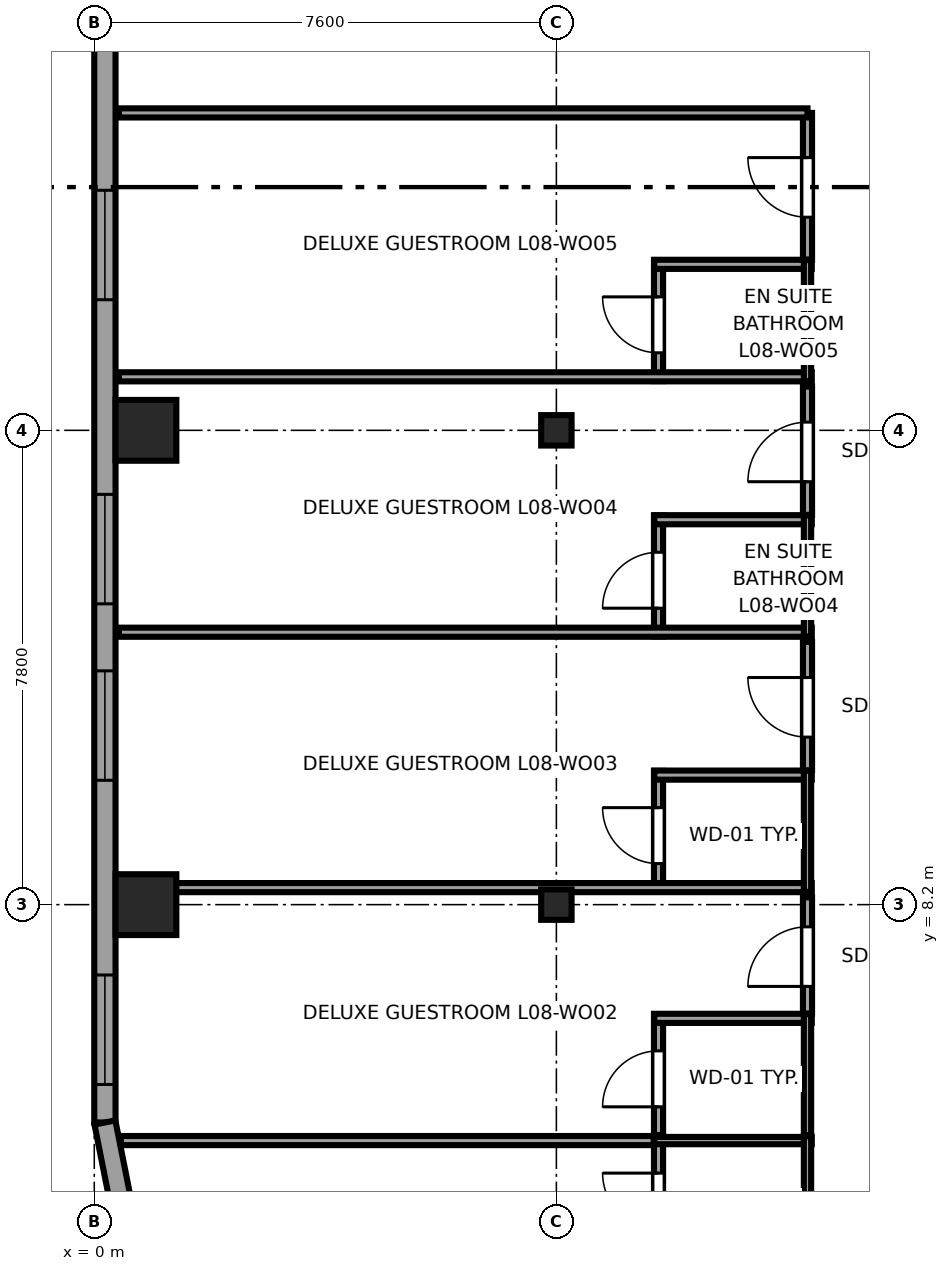
"""IFC4 building model, lengths in metres.
Left out: names, types, materials, properties, quantities, classifications, styles, units other than length and angle.
Written with IfcOpenShell. Run it as: python <this file> out.ifc"""

import sys

from ifc_helpers import new_model, si_unit, direction, frame, frame_2d, origin, origin_2d, place, context, subcontext, project, spatial, rectangle, i_section, extrude, source, transform, mapped, element, fill, save


model = new_model("IFC4")
c1 = context("Model", 3, precision=1e-05, world=origin(), true_north=direction((0.0, 1.0)))
c2 = subcontext(c1, "Body", "Model", "MODEL_VIEW")
j1 = project(units=[si_unit("LENGTHUNIT", "METRE"), si_unit("PLANEANGLEUNIT", "RADIAN")], contexts=[c1])
p1 = place(None, origin())
s1 = spatial("IfcSite", under=j1, at=p1, CompositionType="ELEMENT")
p2 = place(p1, origin())
s2 = spatial("IfcBuilding", under=s1, at=p2, CompositionType="ELEMENT")
p3 = place(p2, frame((0.0, 0.0, 39.1)))
s3 = spatial("IfcBuildingStorey", under=s2, at=p3, CompositionType="ELEMENT", Elevation=39.1)
m1 = source(origin(), c2, "Body", "SweptSolid", [
    extrude(rectangle(XDim=1.0, YDim=1.0, at=origin_2d()), origin(), (0.0, 0.0, 1.0), 3.55),
])
for number, where, z_axis, x_axis in (
    (1, (0.85, 8.2, 0.0), (0.0, 0.0, 1.0), (1.0, 0.0, 0.0)),
    (2, (0.85, 16.0, 0.0), (0.0, 0.0, 1.0), (1.0, 0.0, 0.0)),
):
    element("IfcColumn", number, at=place(p3, frame(where, z_axis=z_axis, x_axis=x_axis)), inside=s3, PredefinedType="COLUMN", context=c2, shape_type="MappedRepresentation", body=[
        mapped(m1, transform((0.0, 0.0, 0.0), x_axis=(1.0, 0.0, 0.0), y_axis=(0.0, 1.0, 0.0), z_axis=(0.0, 0.0, 1.0), scale=1.0)),
    ])
m2 = source(origin(), c2, "Body", "SweptSolid", [
    extrude(i_section(OverallWidth=0.5, OverallDepth=0.5, WebThickness=0.028, FlangeThickness=0.045, at=origin_2d()), origin(), (0.0, 0.0, 1.0), 3.55),
])
for number, where, z_axis, x_axis in (
    (3, (7.6, 8.2, 0.0), (0.0, 0.0, 1.0), (1.0, 0.0, 0.0)),
    (4, (7.6, 16.0, 0.0), (0.0, 0.0, 1.0), (1.0, 0.0, 0.0)),
):
    element("IfcColumn", number, at=place(p3, frame(where, z_axis=z_axis, x_axis=x_axis)), inside=s3, PredefinedType="COLUMN", context=c2, shape_type="MappedRepresentation", body=[
        mapped(m2, transform((0.0, 0.0, 0.0), x_axis=(1.0, 0.0, 0.0), y_axis=(0.0, 1.0, 0.0), z_axis=(0.0, 0.0, 1.0), scale=1.0)),
    ])
p4 = place(p3, frame((0.175, 41.383, 0.0), z_axis=(0.0, 0.0, 1.0), x_axis=(0.0, -1.0, 0.0)))
e5 = element("IfcWall", 5, at=p4, inside=s3, PredefinedType="SOLIDWALL", context=c2, shape_type="SweptSolid", body=[
    extrude(rectangle(XDim=36.766, YDim=0.35, at=frame_2d((18.383, 0.0))), origin(), (0.0, 0.0, 1.0), 3.37),
])
p5 = place(p4, frame((1.676, 0.0, 0.68)))
e6 = element("IfcOpeningElement", 6, at=p5, cuts=e5, PredefinedType="OPENING", context=c2, shape_type="SweptSolid", body=[
    extrude(rectangle(XDim=1.8, YDim=1.85, at=frame_2d((0.9, 0.925))), frame((0.0, 0.185, 0.0), z_axis=(0.0, -1.0, 0.0), x_axis=(1.0, 0.0, 0.0)), (0.0, 0.0, 1.0), 0.37),
])
p6 = place(p4, frame((4.578, 0.0, 0.68)))
e7 = element("IfcOpeningElement", 7, at=p6, cuts=e5, PredefinedType="OPENING", context=c2, shape_type="SweptSolid", body=[
    extrude(rectangle(XDim=1.8, YDim=1.85, at=frame_2d((0.9, 0.925))), frame((0.0, 0.185, 0.0), z_axis=(0.0, -1.0, 0.0), x_axis=(1.0, 0.0, 0.0)), (0.0, 0.0, 1.0), 0.37),
])
p7 = place(p4, frame((13.531, 0.0, 0.68)))
e8 = element("IfcOpeningElement", 8, at=p7, cuts=e5, PredefinedType="OPENING", context=c2, shape_type="SweptSolid", body=[
    extrude(rectangle(XDim=1.8, YDim=1.85, at=frame_2d((0.9, 0.925))), frame((0.0, 0.185, 0.0), z_axis=(0.0, -1.0, 0.0), x_axis=(1.0, 0.0, 0.0)), (0.0, 0.0, 1.0), 0.37),
])
p8 = place(p4, frame((21.435, 0.0, 0.68)))
e9 = element("IfcOpeningElement", 9, at=p8, cuts=e5, PredefinedType="OPENING", context=c2, shape_type="SweptSolid", body=[
    extrude(rectangle(XDim=1.8, YDim=1.85, at=frame_2d((0.9, 0.925))), frame((0.0, 0.185, 0.0), z_axis=(0.0, -1.0, 0.0), x_axis=(1.0, 0.0, 0.0)), (0.0, 0.0, 1.0), 0.37),
])
p9 = place(p4, frame((26.436, 0.0, 0.68)))
e10 = element("IfcOpeningElement", 10, at=p9, cuts=e5, PredefinedType="OPENING", context=c2, shape_type="SweptSolid", body=[
    extrude(rectangle(XDim=1.8, YDim=1.85, at=frame_2d((0.9, 0.925))), frame((0.0, 0.185, 0.0), z_axis=(0.0, -1.0, 0.0), x_axis=(1.0, 0.0, 0.0)), (0.0, 0.0, 1.0), 0.37),
])
p10 = place(p4, frame((29.338, 0.0, 0.68)))
e11 = element("IfcOpeningElement", 11, at=p10, cuts=e5, PredefinedType="OPENING", context=c2, shape_type="SweptSolid", body=[
    extrude(rectangle(XDim=1.8, YDim=1.85, at=frame_2d((0.9, 0.925))), frame((0.0, 0.185, 0.0), z_axis=(0.0, -1.0, 0.0), x_axis=(1.0, 0.0, 0.0)), (0.0, 0.0, 1.0), 0.37),
])
p11 = place(p4, frame((34.34, 0.0, 0.68)))
e12 = element("IfcOpeningElement", 12, at=p11, cuts=e5, PredefinedType="OPENING", context=c2, shape_type="SweptSolid", body=[
    extrude(rectangle(XDim=1.8, YDim=1.85, at=frame_2d((0.9, 0.925))), frame((0.0, 0.185, 0.0), z_axis=(0.0, -1.0, 0.0), x_axis=(1.0, 0.0, 0.0)), (0.0, 0.0, 1.0), 0.37),
])
p12 = place(p3, frame((0.175, 4.617, 0.0), z_axis=(0.0, 0.0, 1.0), x_axis=(0.195011420161, -0.980800971659, 0.0)))
e13 = element("IfcWall", 13, at=p12, inside=s3, PredefinedType="SOLIDWALL", context=c2, shape_type="SweptSolid", body=[
    extrude(rectangle(XDim=1.743, YDim=0.35, at=frame_2d((0.871, 0.0))), origin(), (0.0, 0.0, 1.0), 3.37),
])
p13 = place(p3, frame((9.28, 2.4, 0.0), z_axis=(0.0, 0.0, 1.0), x_axis=(0.0, 1.0, 0.0)))
e14 = element("IfcWall", 14, at=p13, inside=s3, PredefinedType="PARTITIONING", context=c2, shape_type="SweptSolid", body=[
    extrude(rectangle(XDim=1.99, YDim=0.15, at=frame_2d((0.995, 0.0))), origin(), (0.0, 0.0, 1.0), 3.37),
])
p14 = place(p13, frame((0.465, 0.0, 0.0)))
e15 = element("IfcOpeningElement", 15, at=p14, cuts=e14, PredefinedType="OPENING", context=c2, shape_type="SweptSolid", body=[
    extrude(rectangle(XDim=0.92, YDim=2.01, at=frame_2d((0.46, 1.005))), frame((0.0, 0.085, 0.0), z_axis=(0.0, -1.0, 0.0), x_axis=(1.0, 0.0, 0.0)), (0.0, 0.0, 1.0), 0.17),
])
p15 = place(p3, frame((9.21, 4.32, 0.0), z_axis=(0.0, 0.0, 1.0), x_axis=(1.0, 0.0, 0.0)))
e16 = element("IfcWall", 16, at=p15, inside=s3, PredefinedType="PLUMBINGWALL", context=c2, shape_type="SweptSolid", body=[
    extrude(rectangle(XDim=2.59, YDim=0.12, at=frame_2d((1.295, 0.0))), origin(), (0.0, 0.0, 1.0), 3.37),
])
p16 = place(p3, frame((11.73, 2.4, 0.0), z_axis=(0.0, 0.0, 1.0), x_axis=(0.0, 1.0, 0.0)))
e17 = element("IfcWall", 17, at=p16, inside=s3, PredefinedType="PLUMBINGWALL", context=c2, shape_type="SweptSolid", body=[
    extrude(rectangle(XDim=1.99, YDim=0.12, at=frame_2d((0.995, 0.0))), origin(), (0.0, 0.0, 1.0), 3.37),
])
p17 = place(p3, frame((9.28, 4.41, 0.0), z_axis=(0.0, 0.0, 1.0), x_axis=(0.0, 1.0, 0.0)))
e18 = element("IfcWall", 18, at=p17, inside=s3, PredefinedType="PARTITIONING", context=c2, shape_type="SweptSolid", body=[
    extrude(rectangle(XDim=1.99, YDim=0.15, at=frame_2d((0.995, 0.0))), origin(), (0.0, 0.0, 1.0), 3.37),
])
p18 = place(p17, frame((0.465, 0.0, 0.0)))
e19 = element("IfcOpeningElement", 19, at=p18, cuts=e18, PredefinedType="OPENING", context=c2, shape_type="SweptSolid", body=[
    extrude(rectangle(XDim=0.92, YDim=2.01, at=frame_2d((0.46, 1.005))), frame((0.0, 0.085, 0.0), z_axis=(0.0, -1.0, 0.0), x_axis=(1.0, 0.0, 0.0)), (0.0, 0.0, 1.0), 0.17),
])
p19 = place(p3, frame((9.21, 6.33, 0.0), z_axis=(0.0, 0.0, 1.0), x_axis=(1.0, 0.0, 0.0)))
e20 = element("IfcWall", 20, at=p19, inside=s3, PredefinedType="PARTITIONING", context=c2, shape_type="SweptSolid", body=[
    extrude(rectangle(XDim=2.59, YDim=0.15, at=frame_2d((1.295, 0.0))), origin(), (0.0, 0.0, 1.0), 3.37),
])
p20 = place(p3, frame((11.73, 4.41, 0.0), z_axis=(0.0, 0.0, 1.0), x_axis=(0.0, 1.0, 0.0)))
e21 = element("IfcWall", 21, at=p20, inside=s3, PredefinedType="PLUMBINGWALL", context=c2, shape_type="SweptSolid", body=[
    extrude(rectangle(XDim=1.99, YDim=0.12, at=frame_2d((0.995, 0.0))), origin(), (0.0, 0.0, 1.0), 3.37),
])
p21 = place(p3, frame((9.28, 8.41, 0.0), z_axis=(0.0, 0.0, 1.0), x_axis=(0.0, 1.0, 0.0)))
e22 = element("IfcWall", 22, at=p21, inside=s3, PredefinedType="PARTITIONING", context=c2, shape_type="SweptSolid", body=[
    extrude(rectangle(XDim=1.99, YDim=0.15, at=frame_2d((0.995, 0.0))), origin(), (0.0, 0.0, 1.0), 3.37),
])
p22 = place(p21, frame((0.465, 0.0, 0.0)))
e23 = element("IfcOpeningElement", 23, at=p22, cuts=e22, PredefinedType="OPENING", context=c2, shape_type="SweptSolid", body=[
    extrude(rectangle(XDim=0.92, YDim=2.01, at=frame_2d((0.46, 1.005))), frame((0.0, 0.085, 0.0), z_axis=(0.0, -1.0, 0.0), x_axis=(1.0, 0.0, 0.0)), (0.0, 0.0, 1.0), 0.17),
])
p23 = place(p3, frame((0.405, 8.48, 0.0), z_axis=(0.0, 0.0, 1.0), x_axis=(1.0, 0.0, 0.0)))
e24 = element("IfcWall", 24, at=p23, inside=s3, PredefinedType="PARTITIONING", context=c2, shape_type="SweptSolid", body=[
    extrude(rectangle(XDim=11.395, YDim=0.15, at=frame_2d((5.698, 0.0))), origin(), (0.0, 0.0, 1.0), 3.37),
])
p24 = place(p3, frame((9.21, 10.33, 0.0), z_axis=(0.0, 0.0, 1.0), x_axis=(1.0, 0.0, 0.0)))
e25 = element("IfcWall", 25, at=p24, inside=s3, PredefinedType="PARTITIONING", context=c2, shape_type="SweptSolid", body=[
    extrude(rectangle(XDim=2.59, YDim=0.15, at=frame_2d((1.295, 0.0))), origin(), (0.0, 0.0, 1.0), 3.37),
])
p25 = place(p3, frame((11.73, 8.41, 0.0), z_axis=(0.0, 0.0, 1.0), x_axis=(0.0, 1.0, 0.0)))
e26 = element("IfcWall", 26, at=p25, inside=s3, PredefinedType="PLUMBINGWALL", context=c2, shape_type="SweptSolid", body=[
    extrude(rectangle(XDim=1.99, YDim=0.12, at=frame_2d((0.995, 0.0))), origin(), (0.0, 0.0, 1.0), 3.37),
])
p26 = place(p3, frame((9.28, 12.61, 0.0), z_axis=(0.0, 0.0, 1.0), x_axis=(0.0, 1.0, 0.0)))
e27 = element("IfcWall", 27, at=p26, inside=s3, PredefinedType="PARTITIONING", context=c2, shape_type="SweptSolid", body=[
    extrude(rectangle(XDim=1.99, YDim=0.15, at=frame_2d((0.995, 0.0))), origin(), (0.0, 0.0, 1.0), 3.37),
])
p27 = place(p26, frame((0.465, 0.0, 0.0)))
e28 = element("IfcOpeningElement", 28, at=p27, cuts=e27, PredefinedType="OPENING", context=c2, shape_type="SweptSolid", body=[
    extrude(rectangle(XDim=0.92, YDim=2.01, at=frame_2d((0.46, 1.005))), frame((0.0, 0.085, 0.0), z_axis=(0.0, -1.0, 0.0), x_axis=(1.0, 0.0, 0.0)), (0.0, 0.0, 1.0), 0.17),
])
p28 = place(p3, frame((0.405, 12.68, 0.0), z_axis=(0.0, 0.0, 1.0), x_axis=(1.0, 0.0, 0.0)))
e29 = element("IfcWall", 29, at=p28, inside=s3, PredefinedType="PARTITIONING", context=c2, shape_type="SweptSolid", body=[
    extrude(rectangle(XDim=11.395, YDim=0.15, at=frame_2d((5.698, 0.0))), origin(), (0.0, 0.0, 1.0), 3.37),
])
p29 = place(p3, frame((9.21, 14.53, 0.0), z_axis=(0.0, 0.0, 1.0), x_axis=(1.0, 0.0, 0.0)))
e30 = element("IfcWall", 30, at=p29, inside=s3, PredefinedType="PARTITIONING", context=c2, shape_type="SweptSolid", body=[
    extrude(rectangle(XDim=2.59, YDim=0.15, at=frame_2d((1.295, 0.0))), origin(), (0.0, 0.0, 1.0), 3.37),
])
p30 = place(p3, frame((11.73, 12.61, 0.0), z_axis=(0.0, 0.0, 1.0), x_axis=(0.0, 1.0, 0.0)))
e31 = element("IfcWall", 31, at=p30, inside=s3, PredefinedType="PLUMBINGWALL", context=c2, shape_type="SweptSolid", body=[
    extrude(rectangle(XDim=1.99, YDim=0.12, at=frame_2d((0.995, 0.0))), origin(), (0.0, 0.0, 1.0), 3.37),
])
p31 = place(p3, frame((9.28, 16.81, 0.0), z_axis=(0.0, 0.0, 1.0), x_axis=(0.0, 1.0, 0.0)))
e32 = element("IfcWall", 32, at=p31, inside=s3, PredefinedType="PARTITIONING", context=c2, shape_type="SweptSolid", body=[
    extrude(rectangle(XDim=1.99, YDim=0.15, at=frame_2d((0.995, 0.0))), origin(), (0.0, 0.0, 1.0), 3.37),
])
p32 = place(p31, frame((0.465, 0.0, 0.0)))
e33 = element("IfcOpeningElement", 33, at=p32, cuts=e32, PredefinedType="OPENING", context=c2, shape_type="SweptSolid", body=[
    extrude(rectangle(XDim=0.92, YDim=2.01, at=frame_2d((0.46, 1.005))), frame((0.0, 0.085, 0.0), z_axis=(0.0, -1.0, 0.0), x_axis=(1.0, 0.0, 0.0)), (0.0, 0.0, 1.0), 0.17),
])
p33 = place(p3, frame((0.405, 16.88, 0.0), z_axis=(0.0, 0.0, 1.0), x_axis=(1.0, 0.0, 0.0)))
e34 = element("IfcWall", 34, at=p33, inside=s3, PredefinedType="PARTITIONING", context=c2, shape_type="SweptSolid", body=[
    extrude(rectangle(XDim=11.395, YDim=0.15, at=frame_2d((5.698, 0.0))), origin(), (0.0, 0.0, 1.0), 3.37),
])
p34 = place(p3, frame((9.21, 18.73, 0.0), z_axis=(0.0, 0.0, 1.0), x_axis=(1.0, 0.0, 0.0)))
e35 = element("IfcWall", 35, at=p34, inside=s3, PredefinedType="PARTITIONING", context=c2, shape_type="SweptSolid", body=[
    extrude(rectangle(XDim=2.59, YDim=0.15, at=frame_2d((1.295, 0.0))), origin(), (0.0, 0.0, 1.0), 3.37),
])
p35 = place(p3, frame((11.73, 16.81, 0.0), z_axis=(0.0, 0.0, 1.0), x_axis=(0.0, 1.0, 0.0)))
e36 = element("IfcWall", 36, at=p35, inside=s3, PredefinedType="PLUMBINGWALL", context=c2, shape_type="SweptSolid", body=[
    extrude(rectangle(XDim=1.99, YDim=0.12, at=frame_2d((0.995, 0.0))), origin(), (0.0, 0.0, 1.0), 3.37),
])
p36 = place(p3, frame((0.437, 4.32, 0.0), z_axis=(0.0, 0.0, 1.0), x_axis=(1.0, 0.0, 0.0)))
e37 = element("IfcWall", 37, at=p36, inside=s3, PredefinedType="PARTITIONING", context=c2, shape_type="SweptSolid", body=[
    extrude(rectangle(XDim=8.763, YDim=0.15, at=frame_2d((4.381, 0.0))), origin(), (0.0, 0.0, 1.0), 3.37),
])
p37 = place(p3, frame((11.73, 6.41, 0.0), z_axis=(0.0, 0.0, 1.0), x_axis=(0.0, 1.0, 0.0)))
e38 = element("IfcWall", 38, at=p37, inside=s3, PredefinedType="PARTITIONING", context=c2, shape_type="SweptSolid", body=[
    extrude(rectangle(XDim=1.91, YDim=0.15, at=frame_2d((0.955, 0.0))), origin(), (0.0, 0.0, 1.0), 3.37),
])
p38 = place(p37, frame((0.445, 0.0, 0.0)))
e39 = element("IfcOpeningElement", 39, at=p38, cuts=e38, PredefinedType="OPENING", context=c2, shape_type="SweptSolid", body=[
    extrude(rectangle(XDim=0.98, YDim=2.12, at=frame_2d((0.49, 1.06))), frame((0.0, 0.085, 0.0), z_axis=(0.0, -1.0, 0.0), x_axis=(1.0, 0.0, 0.0)), (0.0, 0.0, 1.0), 0.17),
])
p39 = place(p3, frame((11.73, 10.41, 0.0), z_axis=(0.0, 0.0, 1.0), x_axis=(0.0, 1.0, 0.0)))
e40 = element("IfcWall", 40, at=p39, inside=s3, PredefinedType="PARTITIONING", context=c2, shape_type="SweptSolid", body=[
    extrude(rectangle(XDim=2.11, YDim=0.15, at=frame_2d((1.055, 0.0))), origin(), (0.0, 0.0, 1.0), 3.37),
])
p40 = place(p39, frame((0.545, 0.0, 0.0)))
e41 = element("IfcOpeningElement", 41, at=p40, cuts=e40, PredefinedType="OPENING", context=c2, shape_type="SweptSolid", body=[
    extrude(rectangle(XDim=0.98, YDim=2.12, at=frame_2d((0.49, 1.06))), frame((0.0, 0.085, 0.0), z_axis=(0.0, -1.0, 0.0), x_axis=(1.0, 0.0, 0.0)), (0.0, 0.0, 1.0), 0.17),
])
p41 = place(p3, frame((11.73, 14.61, 0.0), z_axis=(0.0, 0.0, 1.0), x_axis=(0.0, 1.0, 0.0)))
e42 = element("IfcWall", 42, at=p41, inside=s3, PredefinedType="PARTITIONING", context=c2, shape_type="SweptSolid", body=[
    extrude(rectangle(XDim=2.11, YDim=0.15, at=frame_2d((1.055, 0.0))), origin(), (0.0, 0.0, 1.0), 3.37),
])
p42 = place(p41, frame((0.545, 0.0, 0.0)))
e43 = element("IfcOpeningElement", 43, at=p42, cuts=e42, PredefinedType="OPENING", context=c2, shape_type="SweptSolid", body=[
    extrude(rectangle(XDim=0.98, YDim=2.12, at=frame_2d((0.49, 1.06))), frame((0.0, 0.085, 0.0), z_axis=(0.0, -1.0, 0.0), x_axis=(1.0, 0.0, 0.0)), (0.0, 0.0, 1.0), 0.17),
])
p43 = place(p3, frame((11.73, 18.81, 0.0), z_axis=(0.0, 0.0, 1.0), x_axis=(0.0, 1.0, 0.0)))
e44 = element("IfcWall", 44, at=p43, inside=s3, PredefinedType="PARTITIONING", context=c2, shape_type="SweptSolid", body=[
    extrude(rectangle(XDim=2.41, YDim=0.15, at=frame_2d((1.205, 0.0))), origin(), (0.0, 0.0, 1.0), 3.37),
])
p44 = place(p43, frame((0.695, 0.0, 0.0)))
e45 = element("IfcOpeningElement", 45, at=p44, cuts=e44, PredefinedType="OPENING", context=c2, shape_type="SweptSolid", body=[
    extrude(rectangle(XDim=0.98, YDim=2.12, at=frame_2d((0.49, 1.06))), frame((0.0, 0.085, 0.0), z_axis=(0.0, -1.0, 0.0), x_axis=(1.0, 0.0, 0.0)), (0.0, 0.0, 1.0), 0.17),
])
p45 = place(p3, frame((0.405, 21.22, 0.0), z_axis=(0.0, 0.0, 1.0), x_axis=(1.0, 0.0, 0.0)))
e46 = element("IfcWall", 46, at=p45, inside=s3, PredefinedType="PARTITIONING", context=c2, shape_type="SweptSolid", body=[
    extrude(rectangle(XDim=11.325, YDim=0.15, at=frame_2d((5.663, 0.0))), origin(), (0.0, 0.0, 1.0), 3.37),
])
m3 = source(origin(), c2, "Body", "SweptSolid", [
    extrude(rectangle(XDim=1.8, YDim=1.85, at=frame_2d((0.9, 0.925))), frame((0.0, 0.09, 0.0), z_axis=(0.0, -1.0, 0.0), x_axis=(1.0, 0.0, 0.0)), (0.0, 0.0, 1.0), 0.06),
])
p46 = place(p8, origin())
e47 = element("IfcWindow", 47, at=p46, inside=s3, PartitioningType="TRIPLE_PANEL_HORIZONTAL", PredefinedType="WINDOW", context=c2, shape_type="MappedRepresentation", body=[
    mapped(m3, transform((0.0, 0.0, 0.0), x_axis=(1.0, 0.0, 0.0), y_axis=(0.0, 1.0, 0.0), z_axis=(0.0, 0.0, 1.0), scale=1.0)),
])
fill(e9, e47)
p47 = place(p9, origin())
e48 = element("IfcWindow", 48, at=p47, inside=s3, PartitioningType="TRIPLE_PANEL_HORIZONTAL", PredefinedType="WINDOW", context=c2, shape_type="MappedRepresentation", body=[
    mapped(m3, transform((0.0, 0.0, 0.0), x_axis=(1.0, 0.0, 0.0), y_axis=(0.0, 1.0, 0.0), z_axis=(0.0, 0.0, 1.0), scale=1.0)),
])
fill(e10, e48)
p48 = place(p10, origin())
e49 = element("IfcWindow", 49, at=p48, inside=s3, PartitioningType="TRIPLE_PANEL_HORIZONTAL", PredefinedType="WINDOW", context=c2, shape_type="MappedRepresentation", body=[
    mapped(m3, transform((0.0, 0.0, 0.0), x_axis=(1.0, 0.0, 0.0), y_axis=(0.0, 1.0, 0.0), z_axis=(0.0, 0.0, 1.0), scale=1.0)),
])
fill(e11, e49)
p49 = place(p11, origin())
e50 = element("IfcWindow", 50, at=p49, inside=s3, PartitioningType="TRIPLE_PANEL_HORIZONTAL", PredefinedType="WINDOW", context=c2, shape_type="MappedRepresentation", body=[
    mapped(m3, transform((0.0, 0.0, 0.0), x_axis=(1.0, 0.0, 0.0), y_axis=(0.0, 1.0, 0.0), z_axis=(0.0, 0.0, 1.0), scale=1.0)),
])
fill(e12, e50)
m4 = source(origin(), c2, "Body", "SweptSolid", [
    extrude(rectangle(XDim=0.92, YDim=2.01, at=frame_2d((0.46, 1.005))), frame((0.0, 0.025, 0.0), z_axis=(0.0, -1.0, 0.0), x_axis=(1.0, 0.0, 0.0)), (0.0, 0.0, 1.0), 0.05),
])
p50 = place(p14, origin())
e51 = element("IfcDoor", 51, at=p50, inside=s3, OperationType="SINGLE_SWING_RIGHT", PredefinedType="DOOR", context=c2, shape_type="MappedRepresentation", body=[
    mapped(m4, transform((0.0, 0.0, 0.0), x_axis=(1.0, 0.0, 0.0), y_axis=(0.0, 1.0, 0.0), z_axis=(0.0, 0.0, 1.0), scale=1.0)),
])
fill(e15, e51)
p51 = place(p18, origin())
e52 = element("IfcDoor", 52, at=p51, inside=s3, OperationType="SINGLE_SWING_LEFT", PredefinedType="DOOR", context=c2, shape_type="MappedRepresentation", body=[
    mapped(m4, transform((0.0, 0.0, 0.0), x_axis=(1.0, 0.0, 0.0), y_axis=(0.0, 1.0, 0.0), z_axis=(0.0, 0.0, 1.0), scale=1.0)),
])
fill(e19, e52)
p52 = place(p22, origin())
e53 = element("IfcDoor", 53, at=p52, inside=s3, OperationType="SINGLE_SWING_RIGHT", PredefinedType="DOOR", context=c2, shape_type="MappedRepresentation", body=[
    mapped(m4, transform((0.0, 0.0, 0.0), x_axis=(1.0, 0.0, 0.0), y_axis=(0.0, 1.0, 0.0), z_axis=(0.0, 0.0, 1.0), scale=1.0)),
])
fill(e23, e53)
p53 = place(p27, origin())
e54 = element("IfcDoor", 54, at=p53, inside=s3, OperationType="SINGLE_SWING_LEFT", PredefinedType="DOOR", context=c2, shape_type="MappedRepresentation", body=[
    mapped(m4, transform((0.0, 0.0, 0.0), x_axis=(1.0, 0.0, 0.0), y_axis=(0.0, 1.0, 0.0), z_axis=(0.0, 0.0, 1.0), scale=1.0)),
])
fill(e28, e54)
p54 = place(p32, origin())
e55 = element("IfcDoor", 55, at=p54, inside=s3, OperationType="SINGLE_SWING_RIGHT", PredefinedType="DOOR", context=c2, shape_type="MappedRepresentation", body=[
    mapped(m4, transform((0.0, 0.0, 0.0), x_axis=(1.0, 0.0, 0.0), y_axis=(0.0, 1.0, 0.0), z_axis=(0.0, 0.0, 1.0), scale=1.0)),
])
fill(e33, e55)
m5 = source(origin(), c2, "Body", "SweptSolid", [
    extrude(rectangle(XDim=0.98, YDim=2.12, at=frame_2d((0.49, 1.06))), frame((0.0, 0.025, 0.0), z_axis=(0.0, -1.0, 0.0), x_axis=(1.0, 0.0, 0.0)), (0.0, 0.0, 1.0), 0.05),
])
p55 = place(p38, origin())
e56 = element("IfcDoor", 56, at=p55, inside=s3, OperationType="SINGLE_SWING_LEFT", PredefinedType="DOOR", context=c2, shape_type="MappedRepresentation", body=[
    mapped(m5, transform((0.0, 0.0, 0.0), x_axis=(1.0, 0.0, 0.0), y_axis=(0.0, 1.0, 0.0), z_axis=(0.0, 0.0, 1.0), scale=1.0)),
])
fill(e39, e56)
p56 = place(p40, origin())
e57 = element("IfcDoor", 57, at=p56, inside=s3, OperationType="SINGLE_SWING_RIGHT", PredefinedType="DOOR", context=c2, shape_type="MappedRepresentation", body=[
    mapped(m5, transform((0.0, 0.0, 0.0), x_axis=(1.0, 0.0, 0.0), y_axis=(0.0, 1.0, 0.0), z_axis=(0.0, 0.0, 1.0), scale=1.0)),
])
fill(e41, e57)
p57 = place(p42, origin())
e58 = element("IfcDoor", 58, at=p57, inside=s3, OperationType="SINGLE_SWING_LEFT", PredefinedType="DOOR", context=c2, shape_type="MappedRepresentation", body=[
    mapped(m5, transform((0.0, 0.0, 0.0), x_axis=(1.0, 0.0, 0.0), y_axis=(0.0, 1.0, 0.0), z_axis=(0.0, 0.0, 1.0), scale=1.0)),
])
fill(e43, e58)
p58 = place(p44, origin())
e59 = element("IfcDoor", 59, at=p58, inside=s3, OperationType="SINGLE_SWING_RIGHT", PredefinedType="DOOR", context=c2, shape_type="MappedRepresentation", body=[
    mapped(m5, transform((0.0, 0.0, 0.0), x_axis=(1.0, 0.0, 0.0), y_axis=(0.0, 1.0, 0.0), z_axis=(0.0, 0.0, 1.0), scale=1.0)),
])
fill(e45, e59)
save(model, sys.argv[1])
